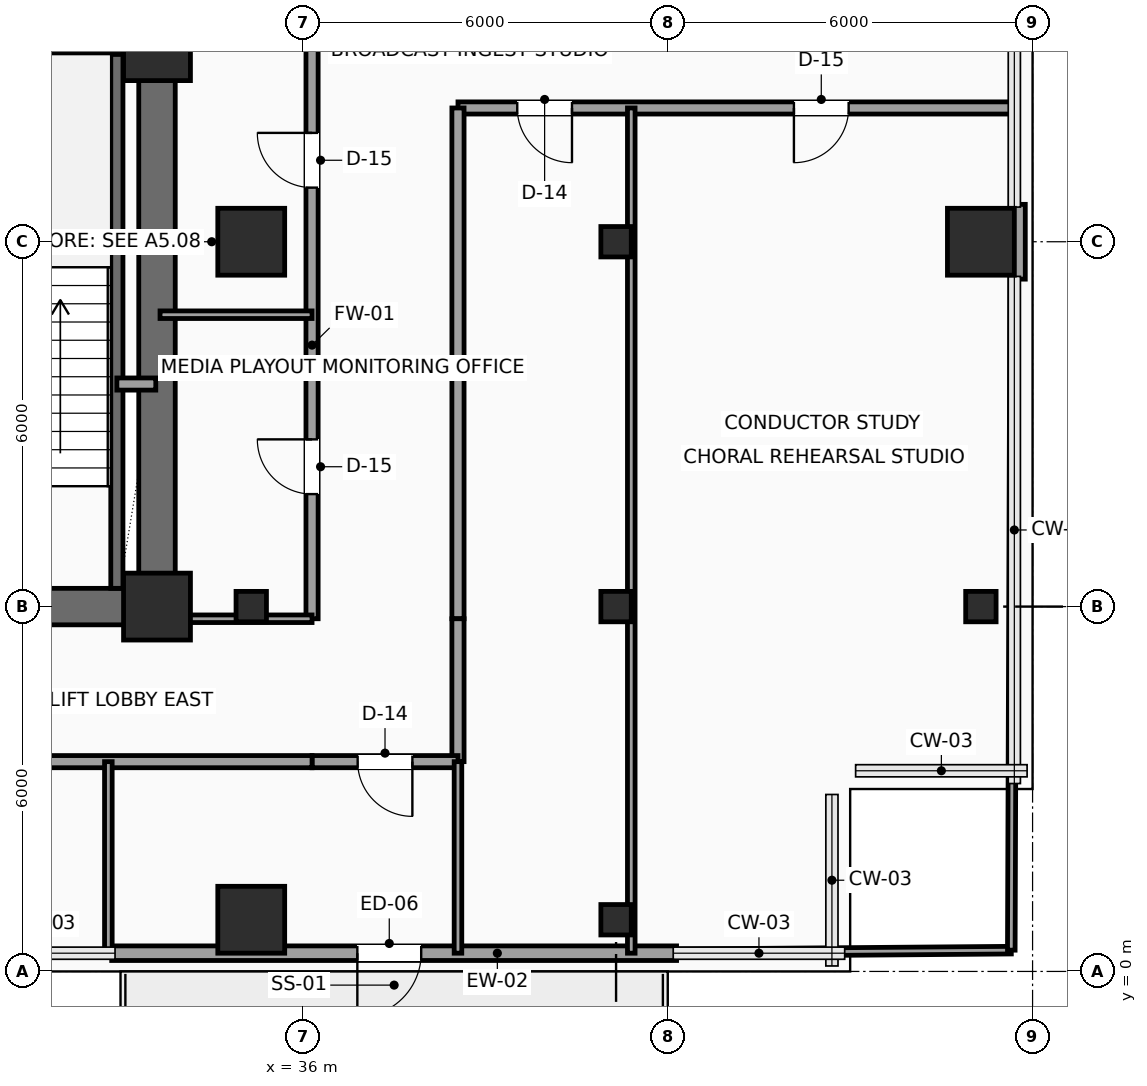
"""IFC4 building model, lengths in metres.
Left out: names, types, materials, properties, quantities, classifications, styles, units other than length and angle.
Written with IfcOpenShell. Run it as: python <this file> out.ifc"""

import sys

from ifc_helpers import new_model, si_unit, direction, frame, frame_2d, origin, origin_2d, place, context, subcontext, project, spatial, rectangle, hollow_rectangle, extrude, element, fill, save


model = new_model("IFC4")
c1 = context("Model", 3, precision=1e-05, world=origin(), true_north=direction((0.0, 1.0)))
c2 = subcontext(c1, "Body", "Model", "MODEL_VIEW")
j1 = project(units=[si_unit("LENGTHUNIT", "METRE"), si_unit("PLANEANGLEUNIT", "RADIAN")], contexts=[c1])
p1 = place(None, origin())
s1 = spatial("IfcSite", under=j1, at=p1, CompositionType="ELEMENT")
p2 = place(p1, origin())
s2 = spatial("IfcBuilding", under=s1, at=p2, CompositionType="ELEMENT")
p3 = place(p2, frame((0.0, 0.0, 149.4)))
s3 = spatial("IfcBuildingStorey", under=s2, at=p3, CompositionType="ELEMENT", Elevation=149.4)
for number, where, z_axis, x_axis in (
    (1, (33.6, 6.0, 0.0), (0.0, 0.0, 1.0), (1.0, 0.0, 0.0)),
    (2, (33.6, 15.2, 0.0), (0.0, 0.0, 1.0), (1.0, 0.0, 0.0)),
    (3, (35.15, 0.85, 0.0), (0.0, 0.0, 1.0), (1.0, 0.0, 0.0)),
):
    element("IfcColumn", number, at=place(p3, frame(where, z_axis=z_axis, x_axis=x_axis)), inside=s3, PredefinedType="COLUMN", context=c2, shape_type="SweptSolid", body=[
        extrude(rectangle(XDim=1.1, YDim=1.1, at=origin_2d()), origin(), (0.0, 0.0, 1.0), 3.75),
    ])
p4 = place(p3, frame((35.15, 6.0, 0.0), z_axis=(0.0, 0.0, 1.0), x_axis=(1.0, 0.0, 0.0)))
e4 = element("IfcColumn", 4, at=p4, inside=s3, PredefinedType="COLUMN", context=c2, shape_type="SweptSolid", body=[
    extrude(hollow_rectangle(XDim=0.5, YDim=0.5, WallThickness=0.025, InnerFilletRadius=0.025, OuterFilletRadius=0.04, at=origin_2d()), origin(), (0.0, 0.0, 1.0), 3.75),
])
p5 = place(p3, frame((35.15, 12.0, 0.0), z_axis=(0.0, 0.0, 1.0), x_axis=(1.0, 0.0, 0.0)))
e5 = element("IfcColumn", 5, at=p5, inside=s3, PredefinedType="COLUMN", context=c2, shape_type="SweptSolid", body=[
    extrude(rectangle(XDim=1.1, YDim=1.1, at=origin_2d()), origin(), (0.0, 0.0, 1.0), 3.75),
])
for number, where, z_axis, x_axis in (
    (6, (41.15, 0.85, 0.0), (0.0, 0.0, 1.0), (1.0, 0.0, 0.0)),
    (7, (41.15, 6.0, 0.0), (0.0, 0.0, 1.0), (1.0, 0.0, 0.0)),
    (8, (41.15, 12.0, 0.0), (0.0, 0.0, 1.0), (1.0, 0.0, 0.0)),
    (9, (47.15, 6.0, 0.0), (0.0, 0.0, 1.0), (1.0, 0.0, 0.0)),
):
    element("IfcColumn", number, at=place(p3, frame(where, z_axis=z_axis, x_axis=x_axis)), inside=s3, PredefinedType="COLUMN", context=c2, shape_type="SweptSolid", body=[
        extrude(hollow_rectangle(XDim=0.5, YDim=0.5, WallThickness=0.025, InnerFilletRadius=0.025, OuterFilletRadius=0.04, at=origin_2d()), origin(), (0.0, 0.0, 1.0), 3.75),
    ])
p6 = place(p3, frame((47.15, 12.0, 0.0), z_axis=(0.0, 0.0, 1.0), x_axis=(1.0, 0.0, 0.0)))
e10 = element("IfcColumn", 10, at=p6, inside=s3, PredefinedType="COLUMN", context=c2, shape_type="SweptSolid", body=[
    extrude(rectangle(XDim=1.1, YDim=1.1, at=origin_2d()), origin(), (0.0, 0.0, 1.0), 3.75),
])
p7 = place(p3, frame((42.145, 0.3, 0.0), z_axis=(0.0, 0.0, 1.0), x_axis=(-1.0, 0.0, 0.0)))
e11 = element("IfcWall", 11, at=p7, inside=s3, PredefinedType="SOLIDWALL", context=c2, shape_type="SweptSolid", body=[
    extrude(rectangle(XDim=9.29, YDim=0.24, at=frame_2d((4.645, 0.0))), origin(), (0.0, 0.0, 1.0), 3.525),
])
p8 = place(p7, frame((4.2, 0.0, 0.0)))
e12 = element("IfcOpeningElement", 12, at=p8, cuts=e11, PredefinedType="OPENING", context=c2, shape_type="SweptSolid", body=[
    extrude(rectangle(XDim=1.05, YDim=2.2, at=frame_2d((0.525, 1.1))), frame((0.0, 0.13, 0.0), z_axis=(0.0, -1.0, 0.0), x_axis=(1.0, 0.0, 0.0)), (0.0, 0.0, 1.0), 0.26),
])
p9 = place(p3, frame((47.76, 12.615, 0.0), z_axis=(0.0, 0.0, 1.0), x_axis=(0.0, -1.0, 0.0)))
e13 = element("IfcWall", 13, at=p9, inside=s3, PredefinedType="SOLIDWALL", context=c2, shape_type="SweptSolid", body=[
    extrude(rectangle(XDim=1.23, YDim=0.24, at=frame_2d((0.615, 0.0))), origin(), (0.0, 0.0, 1.0), 3.525),
])
p10 = place(p3, frame((24.0, 6.0, 0.0), z_axis=(0.0, 0.0, 1.0), x_axis=(1.0, 0.0, 0.0)))
e14 = element("IfcWall", 14, at=p10, inside=s3, PredefinedType="SHEAR", context=c2, shape_type="SweptSolid", body=[
    extrude(rectangle(XDim=9.6, YDim=0.6, at=frame_2d((4.8, 0.0))), origin(), (0.0, 0.0, 1.0), 3.525),
])
p11 = place(p3, frame((33.6, 6.0, 0.0), z_axis=(0.0, 0.0, 1.0), x_axis=(0.0, 1.0, 0.0)))
e15 = element("IfcWall", 15, at=p11, inside=s3, PredefinedType="SHEAR", context=c2, shape_type="SweptSolid", body=[
    extrude(rectangle(XDim=12.0, YDim=0.6, at=frame_2d((6.0, 0.0))), origin(), (0.0, 0.0, 1.0), 3.525),
])
p12 = place(p11, frame((10.15, 0.0, 0.0)))
e16 = element("IfcOpeningElement", 16, at=p12, cuts=e15, PredefinedType="OPENING", context=c2, shape_type="SweptSolid", body=[
    extrude(rectangle(XDim=0.9, YDim=2.15, at=frame_2d((0.45, 1.075))), frame((0.0, 0.31, 0.0), z_axis=(0.0, -1.0, 0.0), x_axis=(1.0, 0.0, 0.0)), (0.0, 0.0, 1.0), 0.62),
])
p13 = place(p3, frame((32.94, 6.3, 0.0), z_axis=(0.0, 0.0, 1.0), x_axis=(0.0, 1.0, 0.0)))
e17 = element("IfcWall", 17, at=p13, inside=s3, PredefinedType="SHEAR", context=c2, shape_type="SweptSolid", body=[
    extrude(rectangle(XDim=8.88, YDim=0.2, at=frame_2d((4.44, 0.0))), origin(), (0.0, 0.0, 1.0), 3.525),
])
p14 = place(p3, frame((29.26, 15.18, 0.0), z_axis=(0.0, 0.0, 1.0), x_axis=(1.0, 0.0, 0.0)))
e18 = element("IfcWall", 18, at=p14, inside=s3, PredefinedType="SHEAR", context=c2, shape_type="SweptSolid", body=[
    extrude(rectangle(XDim=4.04, YDim=0.2, at=frame_2d((2.02, 0.0))), origin(), (0.0, 0.0, 1.0), 3.525),
])
p15 = place(p3, frame((32.94, 9.66, 0.0), z_axis=(0.0, 0.0, 1.0), x_axis=(1.0, 0.0, 0.0)))
e19 = element("IfcWall", 19, at=p15, inside=s3, PredefinedType="SOLIDWALL", context=c2, shape_type="SweptSolid", body=[
    extrude(rectangle(XDim=0.64, YDim=0.2, at=frame_2d((0.32, 0.0))), origin(), (0.0, 0.0, 1.0), 3.525),
])
p16 = place(p3, frame((36.15, 5.8, 0.0), z_axis=(0.0, 0.0, 1.0), x_axis=(0.0, 1.0, 0.0)))
e20 = element("IfcWall", 20, at=p16, inside=s3, PredefinedType="SOLIDWALL", context=c2, shape_type="SweptSolid", body=[
    extrude(rectangle(XDim=10.08, YDim=0.2, at=frame_2d((5.04, 0.0))), origin(), (0.0, 0.0, 1.0), 3.525),
])
p17 = place(p16, frame((2.05, 0.0, 0.0)))
e21 = element("IfcOpeningElement", 21, at=p17, cuts=e20, PredefinedType="OPENING", context=c2, shape_type="SweptSolid", body=[
    extrude(rectangle(XDim=0.9, YDim=2.1, at=frame_2d((0.45, 1.05))), frame((0.0, 0.11, 0.0), z_axis=(0.0, -1.0, 0.0), x_axis=(1.0, 0.0, 0.0)), (0.0, 0.0, 1.0), 0.22),
])
p18 = place(p16, frame((7.09, 0.0, 0.0)))
e22 = element("IfcOpeningElement", 22, at=p18, cuts=e20, PredefinedType="OPENING", context=c2, shape_type="SweptSolid", body=[
    extrude(rectangle(XDim=0.9, YDim=2.1, at=frame_2d((0.45, 1.05))), frame((0.0, 0.11, 0.0), z_axis=(0.0, -1.0, 0.0), x_axis=(1.0, 0.0, 0.0)), (0.0, 0.0, 1.0), 0.22),
])
p19 = place(p3, frame((47.7, 14.2, 0.0), z_axis=(0.0, 0.0, 1.0), x_axis=(-1.0, 0.0, 0.0)))
e23 = element("IfcWall", 23, at=p19, inside=s3, PredefinedType="SOLIDWALL", context=c2, shape_type="SweptSolid", body=[
    extrude(rectangle(XDim=9.15, YDim=0.2, at=frame_2d((4.575, 0.0))), origin(), (0.0, 0.0, 1.0), 3.525),
])
p20 = place(p19, frame((7.275, 0.0, 0.0)))
e24 = element("IfcOpeningElement", 24, at=p20, cuts=e23, PredefinedType="OPENING", context=c2, shape_type="SweptSolid", body=[
    extrude(rectangle(XDim=0.9, YDim=2.1, at=frame_2d((0.45, 1.05))), frame((0.0, 0.11, 0.0), z_axis=(0.0, -1.0, 0.0), x_axis=(1.0, 0.0, 0.0)), (0.0, 0.0, 1.0), 0.22),
])
p21 = place(p19, frame((2.725, 0.0, 0.0)))
e25 = element("IfcOpeningElement", 25, at=p21, cuts=e23, PredefinedType="OPENING", context=c2, shape_type="SweptSolid", body=[
    extrude(rectangle(XDim=0.9, YDim=2.1, at=frame_2d((0.45, 1.05))), frame((0.0, 0.11, 0.0), z_axis=(0.0, -1.0, 0.0), x_axis=(1.0, 0.0, 0.0)), (0.0, 0.0, 1.0), 0.22),
])
p22 = place(p3, frame((38.55, 14.2, 0.0), z_axis=(0.0, 0.0, 1.0), x_axis=(0.0, -1.0, 0.0)))
e26 = element("IfcWall", 26, at=p22, inside=s3, PredefinedType="SOLIDWALL", context=c2, shape_type="SweptSolid", body=[
    extrude(rectangle(XDim=8.4, YDim=0.2, at=frame_2d((4.2, 0.0))), origin(), (0.0, 0.0, 1.0), 3.525),
])
p23 = place(p3, frame((38.55, 5.8, 0.0), z_axis=(0.0, 0.0, 1.0), x_axis=(0.0, -1.0, 0.0)))
e27 = element("IfcWall", 27, at=p23, inside=s3, PredefinedType="SOLIDWALL", context=c2, shape_type="SweptSolid", body=[
    extrude(rectangle(XDim=2.35, YDim=0.2, at=frame_2d((1.175, 0.0))), origin(), (0.0, 0.0, 1.0), 3.525),
])
p24 = place(p3, frame((38.55, 3.45, 0.0), z_axis=(0.0, 0.0, 1.0), x_axis=(-1.0, 0.0, 0.0)))
e28 = element("IfcWall", 28, at=p24, inside=s3, PredefinedType="SOLIDWALL", context=c2, shape_type="SweptSolid", body=[
    extrude(rectangle(XDim=2.4, YDim=0.2, at=frame_2d((1.2, 0.0))), origin(), (0.0, 0.0, 1.0), 3.067),
])
p25 = place(p24, frame((0.75, 0.0, 0.0)))
e29 = element("IfcOpeningElement", 29, at=p25, cuts=e28, PredefinedType="OPENING", context=c2, shape_type="SweptSolid", body=[
    extrude(rectangle(XDim=0.9, YDim=2.1, at=frame_2d((0.45, 1.05))), frame((0.0, 0.11, 0.0), z_axis=(0.0, -1.0, 0.0), x_axis=(1.0, 0.0, 0.0)), (0.0, 0.0, 1.0), 0.22),
])
p26 = place(p3, frame((36.15, 3.45, 0.0), z_axis=(0.0, 0.0, 1.0), x_axis=(-1.0, 0.0, 0.0)))
e30 = element("IfcWall", 30, at=p26, inside=s3, PredefinedType="SOLIDWALL", context=c2, shape_type="SweptSolid", body=[
    extrude(rectangle(XDim=12.2, YDim=0.2, at=frame_2d((6.1, 0.0))), origin(), (0.0, 0.0, 1.0), 3.067),
])
p27 = place(p26, frame((10.175, 0.0, 0.0)))
e31 = element("IfcOpeningElement", 31, at=p27, cuts=e30, PredefinedType="OPENING", context=c2, shape_type="SweptSolid", body=[
    extrude(rectangle(XDim=0.9, YDim=2.1, at=frame_2d((0.45, 1.05))), frame((0.0, 0.11, 0.0), z_axis=(0.0, -1.0, 0.0), x_axis=(1.0, 0.0, 0.0)), (0.0, 0.0, 1.0), 0.22),
])
p28 = place(p26, frame((5.75, 0.0, 0.0)))
e32 = element("IfcOpeningElement", 32, at=p28, cuts=e30, PredefinedType="OPENING", context=c2, shape_type="SweptSolid", body=[
    extrude(rectangle(XDim=0.9, YDim=2.1, at=frame_2d((0.45, 1.05))), frame((0.0, 0.11, 0.0), z_axis=(0.0, -1.0, 0.0), x_axis=(1.0, 0.0, 0.0)), (0.0, 0.0, 1.0), 0.22),
])
for number, where, z_axis, x_axis in (
    (33, (32.8, 0.3, 0.0), (0.0, 0.0, 1.0), (0.0, 1.0, 0.0)),
    (34, (38.55, 0.3, 0.0), (0.0, 0.0, 1.0), (0.0, 1.0, 0.0)),
):
    element("IfcWall", number, at=place(p3, frame(where, z_axis=z_axis, x_axis=x_axis)), inside=s3, PredefinedType="PARTITIONING", context=c2, shape_type="SweptSolid", body=[
        extrude(rectangle(XDim=3.15, YDim=0.125, at=frame_2d((1.575, 0.0))), origin(), (0.0, 0.0, 1.0), 3.525),
    ])
p29 = place(p3, frame((33.65, 5.8, 0.0), z_axis=(0.0, 0.0, 1.0), x_axis=(1.0, 0.0, 0.0)))
e35 = element("IfcWall", 35, at=p29, inside=s3, PredefinedType="PARTITIONING", context=c2, shape_type="SweptSolid", body=[
    extrude(rectangle(XDim=2.5, YDim=0.125, at=frame_2d((1.25, 0.0))), origin(), (0.0, 0.0, 1.0), 3.017),
])
p30 = place(p3, frame((33.65, 10.8, 0.0), z_axis=(0.0, 0.0, 1.0), x_axis=(1.0, 0.0, 0.0)))
e36 = element("IfcWall", 36, at=p30, inside=s3, PredefinedType="PARTITIONING", context=c2, shape_type="SweptSolid", body=[
    extrude(rectangle(XDim=2.5, YDim=0.125, at=frame_2d((1.25, 0.0))), origin(), (0.0, 0.0, 1.0), 3.525),
])
p31 = place(p3, frame((41.4, 0.3, 0.0), z_axis=(0.0, 0.0, 1.0), x_axis=(0.0, 1.0, 0.0)))
e37 = element("IfcWall", 37, at=p31, inside=s3, PredefinedType="PARTITIONING", context=c2, shape_type="SweptSolid", body=[
    extrude(rectangle(XDim=13.9, YDim=0.125, at=frame_2d((6.95, 0.0))), origin(), (0.0, 0.0, 1.0), 3.017),
])
p32 = place(p3, frame((42.145, 0.306, 0.0), z_axis=(0.0, 0.0, 1.0), x_axis=(0.999967782628, 0.008027060877, 0.0)))
e38 = element("IfcWall", 38, at=p32, inside=s3, PredefinedType="PARTITIONING", context=c2, shape_type="SweptSolid", body=[
    extrude(rectangle(XDim=5.505, YDim=0.125, at=frame_2d((2.752, 0.0))), origin(), (0.0, 0.0, 1.0), 3.525),
])
p33 = place(p3, frame((47.65, 0.35, 0.0), z_axis=(0.0, 0.0, 1.0), x_axis=(0.003606251025, 0.999993497456, 0.0)))
e39 = element("IfcWall", 39, at=p33, inside=s3, PredefinedType="PARTITIONING", context=c2, shape_type="SweptSolid", body=[
    extrude(rectangle(XDim=11.035, YDim=0.125, at=frame_2d((5.518, 0.0))), origin(), (0.0, 0.0, 1.0), 3.525),
])
p34 = place(p3, frame((47.694, 12.615, 0.0), z_axis=(0.0, 0.0, 1.0), x_axis=(0.003542799701, 0.999993724265, 0.0)))
e40 = element("IfcWall", 40, at=p34, inside=s3, PredefinedType="PARTITIONING", context=c2, shape_type="SweptSolid", body=[
    extrude(rectangle(XDim=1.585, YDim=0.125, at=frame_2d((0.792, 0.0))), origin(), (0.0, 0.0, 1.0), 3.525),
])
p35 = place(p8, origin())
e41 = element("IfcDoor", 41, at=p35, inside=s3, OperationType="SINGLE_SWING_RIGHT", PredefinedType="DOOR", context=c2, shape_type="SweptSolid", body=[
    extrude(rectangle(XDim=1.05, YDim=2.2, at=frame_2d((0.525, 1.1))), frame((0.0, 0.025, 0.0), z_axis=(0.0, -1.0, 0.0), x_axis=(1.0, 0.0, 0.0)), (0.0, 0.0, 1.0), 0.05),
])
fill(e12, e41)
p36 = place(p17, origin())
e42 = element("IfcDoor", 42, at=p36, inside=s3, OperationType="SINGLE_SWING_RIGHT", PredefinedType="DOOR", context=c2, shape_type="SweptSolid", body=[
    extrude(rectangle(XDim=0.9, YDim=2.1, at=frame_2d((0.45, 1.05))), frame((0.0, 0.025, 0.0), z_axis=(0.0, -1.0, 0.0), x_axis=(1.0, 0.0, 0.0)), (0.0, 0.0, 1.0), 0.05),
])
fill(e21, e42)
p37 = place(p18, origin())
e43 = element("IfcDoor", 43, at=p37, inside=s3, OperationType="SINGLE_SWING_RIGHT", PredefinedType="DOOR", context=c2, shape_type="SweptSolid", body=[
    extrude(rectangle(XDim=0.9, YDim=2.1, at=frame_2d((0.45, 1.05))), frame((0.0, 0.025, 0.0), z_axis=(0.0, -1.0, 0.0), x_axis=(1.0, 0.0, 0.0)), (0.0, 0.0, 1.0), 0.05),
])
fill(e22, e43)
p38 = place(p20, origin())
e44 = element("IfcDoor", 44, at=p38, inside=s3, OperationType="SINGLE_SWING_LEFT", PredefinedType="DOOR", context=c2, shape_type="SweptSolid", body=[
    extrude(rectangle(XDim=0.9, YDim=2.1, at=frame_2d((0.45, 1.05))), frame((0.0, 0.025, 0.0), z_axis=(0.0, -1.0, 0.0), x_axis=(1.0, 0.0, 0.0)), (0.0, 0.0, 1.0), 0.05),
])
fill(e24, e44)
p39 = place(p21, origin())
e45 = element("IfcDoor", 45, at=p39, inside=s3, OperationType="SINGLE_SWING_RIGHT", PredefinedType="DOOR", context=c2, shape_type="SweptSolid", body=[
    extrude(rectangle(XDim=0.9, YDim=2.1, at=frame_2d((0.45, 1.05))), frame((0.0, 0.025, 0.0), z_axis=(0.0, -1.0, 0.0), x_axis=(1.0, 0.0, 0.0)), (0.0, 0.0, 1.0), 0.05),
])
fill(e25, e45)
p40 = place(p25, origin())
e46 = element("IfcDoor", 46, at=p40, inside=s3, OperationType="SINGLE_SWING_LEFT", PredefinedType="DOOR", context=c2, shape_type="SweptSolid", body=[
    extrude(rectangle(XDim=0.9, YDim=2.1, at=frame_2d((0.45, 1.05))), frame((0.0, 0.025, 0.0), z_axis=(0.0, -1.0, 0.0), x_axis=(1.0, 0.0, 0.0)), (0.0, 0.0, 1.0), 0.05),
])
fill(e29, e46)
save(model, sys.argv[1])
